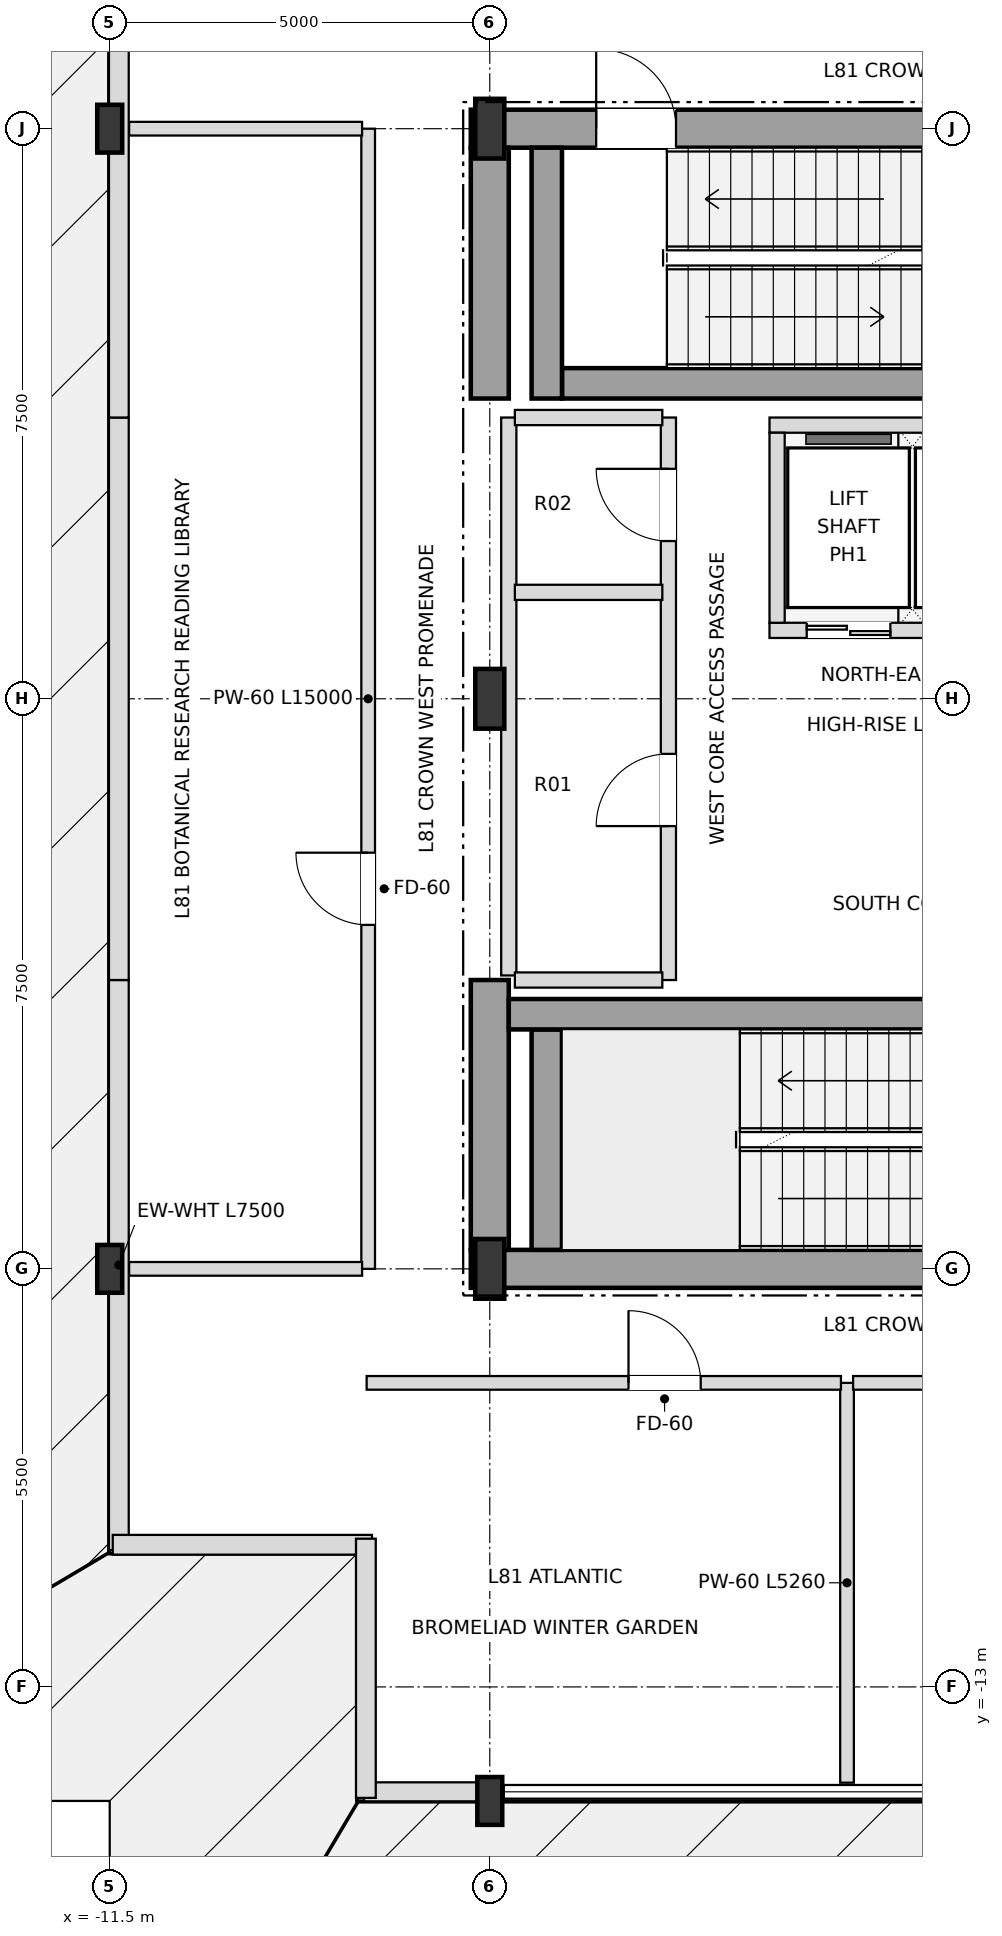
"""IFC4 building model, lengths in metres.
Left out: names, types, materials, properties, quantities, classifications, styles, units other than length and angle.
Written with IfcOpenShell. Run it as: python <this file> out.ifc"""

import sys

from ifc_helpers import new_model, si_unit, direction, frame, frame_2d, origin, origin_2d, place, context, subcontext, project, spatial, rectangle, i_section, extrude, element, fill, save


model = new_model("IFC4")
c1 = context("Model", 3, precision=1e-05, world=origin(), true_north=direction((0.0, 1.0)))
c2 = subcontext(c1, "Body", "Model", "MODEL_VIEW")
j1 = project(units=[si_unit("LENGTHUNIT", "METRE"), si_unit("PLANEANGLEUNIT", "RADIAN")], contexts=[c1])
p1 = place(None, origin())
s1 = spatial("IfcSite", under=j1, at=p1, CompositionType="ELEMENT")
p2 = place(p1, origin())
s2 = spatial("IfcBuilding", under=s1, at=p2, CompositionType="ELEMENT")
p3 = place(p2, frame((0.0, 0.0, 309.9)))
s3 = spatial("IfcBuildingStorey", under=s2, at=p3, CompositionType="ELEMENT", Elevation=309.9)
for number, where, z_axis, x_axis in (
    (1, (-6.5, -7.5, 0.0), (0.0, 0.0, 1.0), (1.0, 0.0, 0.0)),
    (2, (-6.5, 0.0, 0.0), (0.0, 0.0, 1.0), (1.0, 0.0, 0.0)),
    (3, (-6.5, 7.5, 0.0), (0.0, 0.0, 1.0), (1.0, 0.0, 0.0)),
):
    element("IfcColumn", number, at=place(p3, frame(where, z_axis=z_axis, x_axis=x_axis)), inside=s3, PredefinedType="COLUMN", context=c2, shape_type="SweptSolid", body=[
        extrude(i_section(OverallWidth=0.382, OverallDepth=0.786, WebThickness=0.02, FlangeThickness=0.033, at=origin_2d()), origin(), (0.0, 0.0, 1.0), 4.5),
    ])
for number, where, z_axis, x_axis in (
    (4, (-6.5, -14.5, 0.0), (0.0, 0.0, 1.0), (1.0, 0.0, 0.0)),
    (5, (-11.5, -7.5, 0.0), (0.0, 0.0, 1.0), (1.0, 0.0, 0.0)),
    (6, (-11.5, 7.5, 0.0), (0.0, 0.0, 1.0), (1.0, 0.0, 0.0)),
):
    element("IfcColumn", number, at=place(p3, frame(where, z_axis=z_axis, x_axis=x_axis)), inside=s3, PredefinedType="COLUMN", context=c2, shape_type="SweptSolid", body=[
        extrude(i_section(OverallWidth=0.328, OverallDepth=0.629, WebThickness=0.014, FlangeThickness=0.021, at=origin_2d()), origin(), (0.0, 0.0, 1.0), 4.5),
    ])
p4 = place(p3, frame((-8.155, -14.38, 0.0), z_axis=(0.0, 0.0, 1.0), x_axis=(1.0, 0.0, 0.0)))
e7 = element("IfcWall", 7, at=p4, inside=s3, PredefinedType="SOLIDWALL", context=c2, shape_type="SweptSolid", body=[
    extrude(rectangle(XDim=1.496, YDim=0.25, at=frame_2d((0.748, 0.0))), origin(), (0.0, 0.0, 1.0), 4.25),
])
p5 = place(p3, frame((-11.38, -3.7, 0.0), z_axis=(0.0, 0.0, 1.0), x_axis=(0.0, -1.0, 0.0)))
e8 = element("IfcWall", 8, at=p5, inside=s3, PredefinedType="SOLIDWALL", context=c2, shape_type="SweptSolid", body=[
    extrude(rectangle(XDim=7.5, YDim=0.26, at=frame_2d((3.75, 0.0))), origin(), (0.0, 0.0, 1.0), 3.918),
])
p6 = place(p3, frame((-11.38, 3.7, 0.0), z_axis=(0.0, 0.0, 1.0), x_axis=(0.0, -1.0, 0.0)))
e9 = element("IfcWall", 9, at=p6, inside=s3, PredefinedType="SOLIDWALL", context=c2, shape_type="SweptSolid", body=[
    extrude(rectangle(XDim=7.4, YDim=0.26, at=frame_2d((3.7, 0.0))), origin(), (0.0, 0.0, 1.0), 3.918),
])
p7 = place(p3, frame((-11.38, 11.2, 0.0), z_axis=(0.0, 0.0, 1.0), x_axis=(0.0, -1.0, 0.0)))
e10 = element("IfcWall", 10, at=p7, inside=s3, PredefinedType="SOLIDWALL", context=c2, shape_type="SweptSolid", body=[
    extrude(rectangle(XDim=7.5, YDim=0.26, at=frame_2d((3.75, 0.0))), origin(), (0.0, 0.0, 1.0), 3.918),
])
for number, where, z_axis, x_axis in (
    (11, (-11.46, -11.13, 0.0), (0.0, 0.0, 1.0), (1.0, 0.0, 0.0)),
    (12, (-8.13, -11.05, 0.0), (0.0, 0.0, 1.0), (0.0, -1.0, 0.0)),
):
    element("IfcWall", number, at=place(p3, frame(where, z_axis=z_axis, x_axis=x_axis)), inside=s3, PredefinedType="SOLIDWALL", context=c2, shape_type="SweptSolid", body=[
        extrude(rectangle(XDim=3.41, YDim=0.26, at=frame_2d((1.705, 0.0))), origin(), (0.0, 0.0, 1.0), 4.25),
    ])
p8 = place(p3, frame((-6.75, -7.5, 0.0), z_axis=(0.0, 0.0, 1.0), x_axis=(1.0, 0.0, 0.0)))
e13 = element("IfcWall", 13, at=p8, inside=s3, PredefinedType="SHEAR", context=c2, shape_type="SweptSolid", body=[
    extrude(rectangle(XDim=6.75, YDim=0.5, at=frame_2d((3.375, 0.0))), origin(), (0.0, 0.0, 1.0), 4.25),
])
p9 = place(p3, frame((-6.75, 7.5, 0.0), z_axis=(0.0, 0.0, 1.0), x_axis=(1.0, 0.0, 0.0)))
e14 = element("IfcWall", 14, at=p9, inside=s3, PredefinedType="SHEAR", context=c2, shape_type="SweptSolid", body=[
    extrude(rectangle(XDim=6.75, YDim=0.5, at=frame_2d((3.375, 0.0))), origin(), (0.0, 0.0, 1.0), 4.25),
])
p10 = place(p9, frame((1.65, 0.0, 0.0)))
e15 = element("IfcOpeningElement", 15, at=p10, cuts=e14, PredefinedType="OPENING", context=c2, shape_type="SweptSolid", body=[
    extrude(rectangle(XDim=1.05, YDim=2.15, at=frame_2d((0.525, 1.075))), frame((0.0, 0.26, 0.0), z_axis=(0.0, -1.0, 0.0), x_axis=(1.0, 0.0, 0.0)), (0.0, 0.0, 1.0), 0.52),
])
p11 = place(p3, frame((-6.5, -7.25, 0.0), z_axis=(0.0, 0.0, 1.0), x_axis=(0.0, 1.0, 0.0)))
e16 = element("IfcWall", 16, at=p11, inside=s3, PredefinedType="SHEAR", context=c2, shape_type="SweptSolid", body=[
    extrude(rectangle(XDim=3.55, YDim=0.5, at=frame_2d((1.775, 0.0))), origin(), (0.0, 0.0, 1.0), 4.25),
])
p12 = place(p3, frame((-6.5, 3.95, 0.0), z_axis=(0.0, 0.0, 1.0), x_axis=(0.0, 1.0, 0.0)))
e17 = element("IfcWall", 17, at=p12, inside=s3, PredefinedType="SHEAR", context=c2, shape_type="SweptSolid", body=[
    extrude(rectangle(XDim=3.3, YDim=0.5, at=frame_2d((1.65, 0.0))), origin(), (0.0, 0.0, 1.0), 4.25),
])
p13 = place(p3, frame((-5.75, -7.25, 0.0), z_axis=(0.0, 0.0, 1.0), x_axis=(0.0, 1.0, 0.0)))
e18 = element("IfcWall", 18, at=p13, inside=s3, PredefinedType="SHEAR", context=c2, shape_type="SweptSolid", body=[
    extrude(rectangle(XDim=2.9, YDim=0.4, at=frame_2d((1.45, 0.0))), origin(), (0.0, 0.0, 1.0), 4.25),
])
p14 = place(p3, frame((-6.25, -4.15, 0.0), z_axis=(0.0, 0.0, 1.0), x_axis=(1.0, 0.0, 0.0)))
e19 = element("IfcWall", 19, at=p14, inside=s3, PredefinedType="SHEAR", context=c2, shape_type="SweptSolid", body=[
    extrude(rectangle(XDim=7.78, YDim=0.4, at=frame_2d((3.89, 0.0))), origin(), (0.0, 0.0, 1.0), 4.25),
])
p15 = place(p3, frame((-5.55, 4.15, 0.0), z_axis=(0.0, 0.0, 1.0), x_axis=(1.0, 0.0, 0.0)))
e20 = element("IfcWall", 20, at=p15, inside=s3, PredefinedType="SHEAR", context=c2, shape_type="SweptSolid", body=[
    extrude(rectangle(XDim=7.08, YDim=0.4, at=frame_2d((3.54, 0.0))), origin(), (0.0, 0.0, 1.0), 4.25),
])
p16 = place(p3, frame((-5.75, 3.95, 0.0), z_axis=(0.0, 0.0, 1.0), x_axis=(0.0, 1.0, 0.0)))
e21 = element("IfcWall", 21, at=p16, inside=s3, PredefinedType="SHEAR", context=c2, shape_type="SweptSolid", body=[
    extrude(rectangle(XDim=3.3, YDim=0.4, at=frame_2d((1.65, 0.0))), origin(), (0.0, 0.0, 1.0), 4.25),
])
p17 = place(p3, frame((-2.82, 0.9, 0.0), z_axis=(0.0, 0.0, 1.0), x_axis=(1.0, 0.0, 0.0)))
e22 = element("IfcWall", 22, at=p17, inside=s3, PredefinedType="SOLIDWALL", context=c2, shape_type="SweptSolid", body=[
    extrude(rectangle(XDim=5.58, YDim=0.2, at=frame_2d((2.79, 0.0))), origin(), (0.0, 0.0, 1.0), 4.25),
])
p18 = place(p17, frame((0.49, 0.0, 0.0)))
e23 = element("IfcOpeningElement", 23, at=p18, cuts=e22, PredefinedType="OPENING", context=c2, shape_type="SweptSolid", body=[
    extrude(rectangle(XDim=1.1, YDim=2.15, at=frame_2d((0.55, 1.075))), frame((0.0, 0.11, 0.0), z_axis=(0.0, -1.0, 0.0), x_axis=(1.0, 0.0, 0.0)), (0.0, 0.0, 1.0), 0.22),
])
p19 = place(p17, frame((2.17, 0.0, 0.0)))
e24 = element("IfcOpeningElement", 24, at=p19, cuts=e22, PredefinedType="OPENING", context=c2, shape_type="SweptSolid", body=[
    extrude(rectangle(XDim=1.1, YDim=2.15, at=frame_2d((0.55, 1.075))), frame((0.0, 0.11, 0.0), z_axis=(0.0, -1.0, 0.0), x_axis=(1.0, 0.0, 0.0)), (0.0, 0.0, 1.0), 0.22),
])
p20 = place(p17, frame((3.86, 0.0, 0.0)))
e25 = element("IfcOpeningElement", 25, at=p20, cuts=e22, PredefinedType="OPENING", context=c2, shape_type="SweptSolid", body=[
    extrude(rectangle(XDim=1.2, YDim=2.2, at=frame_2d((0.6, 1.1))), frame((0.0, 0.11, 0.0), z_axis=(0.0, -1.0, 0.0), x_axis=(1.0, 0.0, 0.0)), (0.0, 0.0, 1.0), 0.22),
])
p21 = place(p3, frame((-2.82, 3.6, 0.0), z_axis=(0.0, 0.0, 1.0), x_axis=(1.0, 0.0, 0.0)))
e26 = element("IfcWall", 26, at=p21, inside=s3, PredefinedType="SOLIDWALL", context=c2, shape_type="SweptSolid", body=[
    extrude(rectangle(XDim=5.58, YDim=0.2, at=frame_2d((2.79, 0.0))), origin(), (0.0, 0.0, 1.0), 4.25),
])
p22 = place(p3, frame((-2.72, 1.0, 0.0), z_axis=(0.0, 0.0, 1.0), x_axis=(0.0, 1.0, 0.0)))
e27 = element("IfcWall", 27, at=p22, inside=s3, PredefinedType="SOLIDWALL", context=c2, shape_type="SweptSolid", body=[
    extrude(rectangle(XDim=2.5, YDim=0.2, at=frame_2d((1.25, 0.0))), origin(), (0.0, 0.0, 1.0), 4.25),
])
p23 = place(p3, frame((-8.1, -7.5, 0.0), z_axis=(0.0, 0.0, 1.0), x_axis=(0.0, 1.0, 0.0)))
e28 = element("IfcWall", 28, at=p23, inside=s3, PredefinedType="PARTITIONING", context=c2, shape_type="SweptSolid", body=[
    extrude(rectangle(XDim=15.0, YDim=0.18, at=frame_2d((7.5, 0.0))), origin(), (0.0, 0.0, 1.0), 4.25),
])
p24 = place(p23, frame((4.525, 0.0, 0.0)))
e29 = element("IfcOpeningElement", 29, at=p24, cuts=e28, PredefinedType="OPENING", context=c2, shape_type="SweptSolid", body=[
    extrude(rectangle(XDim=0.95, YDim=2.15, at=frame_2d((0.475, 1.075))), frame((0.0, 0.1, 0.0), z_axis=(0.0, -1.0, 0.0), x_axis=(1.0, 0.0, 0.0)), (0.0, 0.0, 1.0), 0.2),
])
p25 = place(p3, frame((-6.25, -3.64, 0.0), z_axis=(0.0, 0.0, 1.0), x_axis=(0.0, 1.0, 0.0)))
e30 = element("IfcWall", 30, at=p25, inside=s3, PredefinedType="SOLIDWALL", context=c2, shape_type="SweptSolid", body=[
    extrude(rectangle(XDim=7.34, YDim=0.2, at=frame_2d((3.67, 0.0))), origin(), (0.0, 0.0, 1.0), 4.25),
])
p26 = place(p3, frame((-4.15, -3.7, 0.0), z_axis=(0.0, 0.0, 1.0), x_axis=(0.0, 1.0, 0.0)))
e31 = element("IfcWall", 31, at=p26, inside=s3, PredefinedType="SOLIDWALL", context=c2, shape_type="SweptSolid", body=[
    extrude(rectangle(XDim=7.4, YDim=0.2, at=frame_2d((3.7, 0.0))), origin(), (0.0, 0.0, 1.0), 4.25),
])
p27 = place(p26, frame((2.025, 0.0, 0.0)))
e32 = element("IfcOpeningElement", 32, at=p27, cuts=e31, PredefinedType="OPENING", context=c2, shape_type="SweptSolid", body=[
    extrude(rectangle(XDim=0.95, YDim=2.15, at=frame_2d((0.475, 1.075))), frame((0.0, 0.11, 0.0), z_axis=(0.0, -1.0, 0.0), x_axis=(1.0, 0.0, 0.0)), (0.0, 0.0, 1.0), 0.22),
])
p28 = place(p26, frame((5.775, 0.0, 0.0)))
e33 = element("IfcOpeningElement", 33, at=p28, cuts=e31, PredefinedType="OPENING", context=c2, shape_type="SweptSolid", body=[
    extrude(rectangle(XDim=0.95, YDim=2.15, at=frame_2d((0.475, 1.075))), frame((0.0, 0.11, 0.0), z_axis=(0.0, -1.0, 0.0), x_axis=(1.0, 0.0, 0.0)), (0.0, 0.0, 1.0), 0.22),
])
p29 = place(p3, frame((-1.8, -14.26, 0.0), z_axis=(0.0, 0.0, 1.0), x_axis=(0.0, 1.0, 0.0)))
e34 = element("IfcWall", 34, at=p29, inside=s3, PredefinedType="PARTITIONING", context=c2, shape_type="SweptSolid", body=[
    extrude(rectangle(XDim=5.26, YDim=0.18, at=frame_2d((2.63, 0.0))), origin(), (0.0, 0.0, 1.0), 4.25),
])
p30 = place(p3, frame((-8.12, -9.0, 0.0), z_axis=(0.0, 0.0, 1.0), x_axis=(1.0, 0.0, 0.0)))
e35 = element("IfcWall", 35, at=p30, inside=s3, PredefinedType="PARTITIONING", context=c2, shape_type="SweptSolid", body=[
    extrude(rectangle(XDim=6.24, YDim=0.18, at=frame_2d((3.12, 0.0))), origin(), (0.0, 0.0, 1.0), 4.25),
])
p31 = place(p30, frame((3.445, 0.0, 0.0)))
e36 = element("IfcOpeningElement", 36, at=p31, cuts=e35, PredefinedType="OPENING", context=c2, shape_type="SweptSolid", body=[
    extrude(rectangle(XDim=0.95, YDim=2.15, at=frame_2d((0.475, 1.075))), frame((0.0, 0.1, 0.0), z_axis=(0.0, -1.0, 0.0), x_axis=(1.0, 0.0, 0.0)), (0.0, 0.0, 1.0), 0.2),
])
p32 = place(p3, frame((-1.72, -9.0, 0.0), z_axis=(0.0, 0.0, 1.0), x_axis=(1.0, 0.0, 0.0)))
e37 = element("IfcWall", 37, at=p32, inside=s3, PredefinedType="PARTITIONING", context=c2, shape_type="SweptSolid", body=[
    extrude(rectangle(XDim=9.84, YDim=0.18, at=frame_2d((4.92, 0.0))), origin(), (0.0, 0.0, 1.0), 4.25),
])
p33 = place(p32, frame((5.445, 0.0, 0.0)))
e38 = element("IfcOpeningElement", 38, at=p33, cuts=e37, PredefinedType="OPENING", context=c2, shape_type="SweptSolid", body=[
    extrude(rectangle(XDim=0.95, YDim=2.15, at=frame_2d((0.475, 1.075))), frame((0.0, 0.1, 0.0), z_axis=(0.0, -1.0, 0.0), x_axis=(1.0, 0.0, 0.0)), (0.0, 0.0, 1.0), 0.2),
])
p34 = place(p3, frame((-11.245, -7.5, 0.0), z_axis=(0.0, 0.0, 1.0), x_axis=(1.0, 0.0, 0.0)))
e39 = element("IfcWall", 39, at=p34, inside=s3, PredefinedType="PARTITIONING", context=c2, shape_type="SweptSolid", body=[
    extrude(rectangle(XDim=3.065, YDim=0.18, at=frame_2d((1.533, 0.0))), origin(), (0.0, 0.0, 1.0), 3.918),
])
for number, where, z_axis, x_axis in (
    (40, (-6.17, -3.7, 0.0), (0.0, 0.0, 1.0), (1.0, 0.0, 0.0)),
    (41, (-6.17, 1.4, 0.0), (0.0, 0.0, 1.0), (1.0, 0.0, 0.0)),
    (42, (-6.17, 3.7, 0.0), (0.0, 0.0, 1.0), (1.0, 0.0, 0.0)),
):
    element("IfcWall", number, at=place(p3, frame(where, z_axis=z_axis, x_axis=x_axis)), inside=s3, PredefinedType="SOLIDWALL", context=c2, shape_type="SweptSolid", body=[
        extrude(rectangle(XDim=1.94, YDim=0.2, at=frame_2d((0.97, 0.0))), origin(), (0.0, 0.0, 1.0), 4.25),
    ])
p35 = place(p3, frame((-11.245, 7.5, 0.0), z_axis=(0.0, 0.0, 1.0), x_axis=(1.0, 0.0, 0.0)))
e43 = element("IfcWall", 43, at=p35, inside=s3, PredefinedType="PARTITIONING", context=c2, shape_type="SweptSolid", body=[
    extrude(rectangle(XDim=3.065, YDim=0.18, at=frame_2d((1.533, 0.0))), origin(), (0.0, 0.0, 1.0), 3.918),
])
p36 = place(p10, origin())
e44 = element("IfcDoor", 44, at=p36, inside=s3, OperationType="SINGLE_SWING_LEFT", PredefinedType="DOOR", context=c2, shape_type="SweptSolid", body=[
    extrude(rectangle(XDim=1.05, YDim=2.15, at=frame_2d((0.525, 1.075))), frame((0.0, 0.025, 0.0), z_axis=(0.0, -1.0, 0.0), x_axis=(1.0, 0.0, 0.0)), (0.0, 0.0, 1.0), 0.05),
])
fill(e15, e44)
p37 = place(p18, origin())
e45 = element("IfcDoor", 45, at=p37, inside=s3, OperationType="DOUBLE_DOOR_SLIDING", PredefinedType="DOOR", context=c2, shape_type="SweptSolid", body=[
    extrude(rectangle(XDim=1.1, YDim=2.15, at=frame_2d((0.55, 1.075))), frame((0.0, 0.025, 0.0), z_axis=(0.0, -1.0, 0.0), x_axis=(1.0, 0.0, 0.0)), (0.0, 0.0, 1.0), 0.05),
])
fill(e23, e45)
p38 = place(p27, origin())
e46 = element("IfcDoor", 46, at=p38, inside=s3, OperationType="SINGLE_SWING_LEFT", PredefinedType="DOOR", context=c2, shape_type="SweptSolid", body=[
    extrude(rectangle(XDim=0.95, YDim=2.15, at=frame_2d((0.475, 1.075))), frame((0.0, 0.025, 0.0), z_axis=(0.0, -1.0, 0.0), x_axis=(1.0, 0.0, 0.0)), (0.0, 0.0, 1.0), 0.05),
])
fill(e32, e46)
p39 = place(p28, origin())
e47 = element("IfcDoor", 47, at=p39, inside=s3, OperationType="SINGLE_SWING_RIGHT", PredefinedType="DOOR", context=c2, shape_type="SweptSolid", body=[
    extrude(rectangle(XDim=0.95, YDim=2.15, at=frame_2d((0.475, 1.075))), frame((0.0, 0.025, 0.0), z_axis=(0.0, -1.0, 0.0), x_axis=(1.0, 0.0, 0.0)), (0.0, 0.0, 1.0), 0.05),
])
fill(e33, e47)
p40 = place(p31, origin())
e48 = element("IfcDoor", 48, at=p40, inside=s3, OperationType="SINGLE_SWING_LEFT", PredefinedType="DOOR", context=c2, shape_type="SweptSolid", body=[
    extrude(rectangle(XDim=0.95, YDim=2.15, at=frame_2d((0.475, 1.075))), frame((0.0, 0.025, 0.0), z_axis=(0.0, -1.0, 0.0), x_axis=(1.0, 0.0, 0.0)), (0.0, 0.0, 1.0), 0.05),
])
fill(e36, e48)
p41 = place(p24, origin())
e49 = element("IfcDoor", 49, at=p41, inside=s3, OperationType="SINGLE_SWING_RIGHT", PredefinedType="DOOR", context=c2, shape_type="SweptSolid", body=[
    extrude(rectangle(XDim=0.95, YDim=2.15, at=frame_2d((0.475, 1.075))), frame((0.0, 0.025, 0.0), z_axis=(0.0, -1.0, 0.0), x_axis=(1.0, 0.0, 0.0)), (0.0, 0.0, 1.0), 0.05),
])
fill(e29, e49)
save(model, sys.argv[1])
